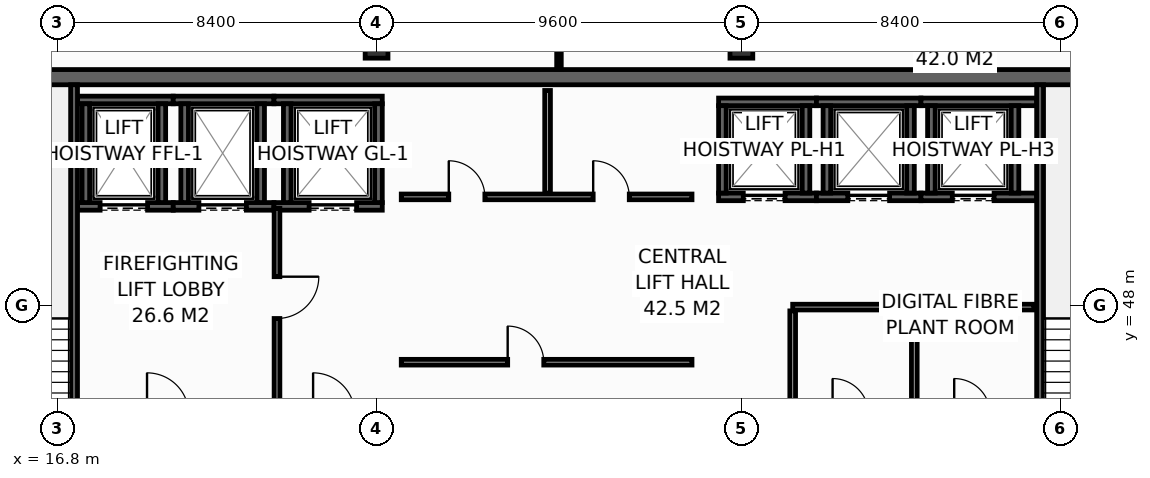
"""IFC4 building model, lengths in metres.
Left out: names, types, materials, properties, quantities, classifications, styles, units other than length and angle.
Written with IfcOpenShell. Run it as: python <this file> out.ifc"""

import sys

from ifc_helpers import new_model, si_unit, direction, frame, frame_2d, origin, origin_2d, place, context, subcontext, project, spatial, rectangle, hollow_rectangle, extrude, element, fill, save


model = new_model("IFC4")
c1 = context("Model", 3, precision=1e-05, world=origin(), true_north=direction((0.0, 1.0)))
c2 = subcontext(c1, "Body", "Model", "MODEL_VIEW")
j1 = project(units=[si_unit("LENGTHUNIT", "METRE"), si_unit("PLANEANGLEUNIT", "RADIAN")], contexts=[c1])
p1 = place(None, origin())
s1 = spatial("IfcSite", under=j1, at=p1, CompositionType="ELEMENT")
p2 = place(p1, origin())
s2 = spatial("IfcBuilding", under=s1, at=p2, CompositionType="ELEMENT")
p3 = place(p2, frame((0.0, 0.0, 291.4)))
s3 = spatial("IfcBuildingStorey", under=s2, at=p3, CompositionType="ELEMENT", Elevation=291.4)
p4 = place(p3, frame((13.7, 54.0, 0.0), z_axis=(0.0, 0.0, 1.0), x_axis=(1.0, 0.0, 0.0)))
e1 = element("IfcWall", 1, at=p4, inside=s3, PredefinedType="SHEAR", context=c2, shape_type="SweptSolid", body=[
    extrude(rectangle(XDim=32.5, YDim=0.4, at=frame_2d((16.25, 0.0))), origin(), (0.0, 0.0, 1.0), 3.55),
])
for number, where, z_axis, x_axis in (
    (2, (25.2, 54.8, 0.0), (0.0, 0.0, 1.0), (1.0, 0.0, 0.0)),
    (3, (34.8, 54.8, 0.0), (0.0, 0.0, 1.0), (1.0, 0.0, 0.0)),
):
    element("IfcColumn", number, at=place(p3, frame(where, z_axis=z_axis, x_axis=x_axis)), inside=s3, PredefinedType="COLUMN", context=c2, shape_type="SweptSolid", body=[
        extrude(hollow_rectangle(XDim=0.6, YDim=0.6, WallThickness=0.028, at=origin_2d()), origin(), (0.0, 0.0, 1.0), 3.8),
    ])
p5 = place(p3, frame((17.33, 50.6, 0.0), z_axis=(0.0, 0.0, 1.0), x_axis=(1.0, 0.0, 0.0)))
e4 = element("IfcWall", 4, at=p5, inside=s3, PredefinedType="SHEAR", context=c2, shape_type="SweptSolid", body=[
    extrude(rectangle(XDim=2.52, YDim=0.2, at=frame_2d((1.26, 0.0))), origin(), (0.0, 0.0, 1.0), 3.55),
])
p6 = place(p5, frame((0.595, 0.0, 0.0)))
e5 = element("IfcOpeningElement", 5, at=p6, cuts=e4, PredefinedType="OPENING", context=c2, shape_type="SweptSolid", body=[
    extrude(rectangle(XDim=1.25, YDim=2.3, at=frame_2d((0.625, 1.15))), frame((0.0, 0.11, 0.0), z_axis=(0.0, -1.0, 0.0), x_axis=(1.0, 0.0, 0.0)), (0.0, 0.0, 1.0), 0.22),
])
p7 = place(p3, frame((17.33, 53.4, 0.0), z_axis=(0.0, 0.0, 1.0), x_axis=(1.0, 0.0, 0.0)))
e6 = element("IfcWall", 6, at=p7, inside=s3, PredefinedType="SHEAR", context=c2, shape_type="SweptSolid", body=[
    extrude(rectangle(XDim=2.52, YDim=0.2, at=frame_2d((1.26, 0.0))), origin(), (0.0, 0.0, 1.0), 3.55),
])
for number, where, z_axis, x_axis in (
    (7, (17.55, 50.7, 0.0), (0.0, 0.0, 1.0), (0.0, 1.0, 0.0)),
    (8, (19.55, 50.7, 0.0), (0.0, 0.0, 1.0), (0.0, 1.0, 0.0)),
):
    element("IfcWall", number, at=place(p3, frame(where, z_axis=z_axis, x_axis=x_axis)), inside=s3, PredefinedType="SHEAR", context=c2, shape_type="SweptSolid", body=[
        extrude(rectangle(XDim=2.6, YDim=0.2, at=frame_2d((1.3, 0.0))), origin(), (0.0, 0.0, 1.0), 3.55),
    ])
p8 = place(p3, frame((19.85, 50.6, 0.0), z_axis=(0.0, 0.0, 1.0), x_axis=(1.0, 0.0, 0.0)))
e9 = element("IfcWall", 9, at=p8, inside=s3, PredefinedType="SHEAR", context=c2, shape_type="SweptSolid", body=[
    extrude(rectangle(XDim=2.65, YDim=0.2, at=frame_2d((1.325, 0.0))), origin(), (0.0, 0.0, 1.0), 3.55),
])
p9 = place(p8, frame((0.675, 0.0, 0.0)))
e10 = element("IfcOpeningElement", 10, at=p9, cuts=e9, PredefinedType="OPENING", context=c2, shape_type="SweptSolid", body=[
    extrude(rectangle(XDim=1.25, YDim=2.3, at=frame_2d((0.625, 1.15))), frame((0.0, 0.11, 0.0), z_axis=(0.0, -1.0, 0.0), x_axis=(1.0, 0.0, 0.0)), (0.0, 0.0, 1.0), 0.22),
])
p10 = place(p3, frame((19.85, 53.4, 0.0), z_axis=(0.0, 0.0, 1.0), x_axis=(1.0, 0.0, 0.0)))
e11 = element("IfcWall", 11, at=p10, inside=s3, PredefinedType="SHEAR", context=c2, shape_type="SweptSolid", body=[
    extrude(rectangle(XDim=2.65, YDim=0.2, at=frame_2d((1.325, 0.0))), origin(), (0.0, 0.0, 1.0), 3.55),
])
for number, where, z_axis, x_axis in (
    (12, (20.15, 50.7, 0.0), (0.0, 0.0, 1.0), (0.0, 1.0, 0.0)),
    (13, (22.15, 50.7, 0.0), (0.0, 0.0, 1.0), (0.0, 1.0, 0.0)),
):
    element("IfcWall", number, at=place(p3, frame(where, z_axis=z_axis, x_axis=x_axis)), inside=s3, PredefinedType="SHEAR", context=c2, shape_type="SweptSolid", body=[
        extrude(rectangle(XDim=2.6, YDim=0.2, at=frame_2d((1.3, 0.0))), origin(), (0.0, 0.0, 1.0), 3.55),
    ])
p11 = place(p3, frame((22.5, 50.6, 0.0), z_axis=(0.0, 0.0, 1.0), x_axis=(1.0, 0.0, 0.0)))
e14 = element("IfcWall", 14, at=p11, inside=s3, PredefinedType="SHEAR", context=c2, shape_type="SweptSolid", body=[
    extrude(rectangle(XDim=2.85, YDim=0.2, at=frame_2d((1.425, 0.0))), origin(), (0.0, 0.0, 1.0), 3.55),
])
p12 = place(p11, frame((0.925, 0.0, 0.0)))
e15 = element("IfcOpeningElement", 15, at=p12, cuts=e14, PredefinedType="OPENING", context=c2, shape_type="SweptSolid", body=[
    extrude(rectangle(XDim=1.25, YDim=2.3, at=frame_2d((0.625, 1.15))), frame((0.0, 0.11, 0.0), z_axis=(0.0, -1.0, 0.0), x_axis=(1.0, 0.0, 0.0)), (0.0, 0.0, 1.0), 0.22),
])
p13 = place(p3, frame((22.5, 53.4, 0.0), z_axis=(0.0, 0.0, 1.0), x_axis=(1.0, 0.0, 0.0)))
e16 = element("IfcWall", 16, at=p13, inside=s3, PredefinedType="SHEAR", context=c2, shape_type="SweptSolid", body=[
    extrude(rectangle(XDim=2.85, YDim=0.2, at=frame_2d((1.425, 0.0))), origin(), (0.0, 0.0, 1.0), 3.55),
])
for number, where, z_axis, x_axis in (
    (17, (22.85, 50.7, 0.0), (0.0, 0.0, 1.0), (0.0, 1.0, 0.0)),
    (18, (25.25, 50.7, 0.0), (0.0, 0.0, 1.0), (0.0, 1.0, 0.0)),
):
    element("IfcWall", number, at=place(p3, frame(where, z_axis=z_axis, x_axis=x_axis)), inside=s3, PredefinedType="SHEAR", context=c2, shape_type="SweptSolid", body=[
        extrude(rectangle(XDim=2.6, YDim=0.2, at=frame_2d((1.3, 0.0))), origin(), (0.0, 0.0, 1.0), 3.55),
    ])
p14 = place(p3, frame((34.2, 50.85, 0.0), z_axis=(0.0, 0.0, 1.0), x_axis=(1.0, 0.0, 0.0)))
e19 = element("IfcWall", 19, at=p14, inside=s3, PredefinedType="SHEAR", context=c2, shape_type="SweptSolid", body=[
    extrude(rectangle(XDim=2.575, YDim=0.2, at=frame_2d((1.288, 0.0))), origin(), (0.0, 0.0, 1.0), 3.55),
])
p15 = place(p14, frame((0.65, 0.0, 0.0)))
e20 = element("IfcOpeningElement", 20, at=p15, cuts=e19, PredefinedType="OPENING", context=c2, shape_type="SweptSolid", body=[
    extrude(rectangle(XDim=1.1, YDim=2.2, at=frame_2d((0.55, 1.1))), frame((0.0, 0.11, 0.0), z_axis=(0.0, -1.0, 0.0), x_axis=(1.0, 0.0, 0.0)), (0.0, 0.0, 1.0), 0.22),
])
p16 = place(p3, frame((34.2, 53.35, 0.0), z_axis=(0.0, 0.0, 1.0), x_axis=(1.0, 0.0, 0.0)))
e21 = element("IfcWall", 21, at=p16, inside=s3, PredefinedType="SHEAR", context=c2, shape_type="SweptSolid", body=[
    extrude(rectangle(XDim=2.575, YDim=0.2, at=frame_2d((1.288, 0.0))), origin(), (0.0, 0.0, 1.0), 3.55),
])
for number, where, z_axis, x_axis in (
    (22, (34.3, 50.95, 0.0), (0.0, 0.0, 1.0), (0.0, 1.0, 0.0)),
    (23, (36.5, 50.95, 0.0), (0.0, 0.0, 1.0), (0.0, 1.0, 0.0)),
):
    element("IfcWall", number, at=place(p3, frame(where, z_axis=z_axis, x_axis=x_axis)), inside=s3, PredefinedType="SHEAR", context=c2, shape_type="SweptSolid", body=[
        extrude(rectangle(XDim=2.3, YDim=0.2, at=frame_2d((1.15, 0.0))), origin(), (0.0, 0.0, 1.0), 3.55),
    ])
p17 = place(p3, frame((36.775, 50.85, 0.0), z_axis=(0.0, 0.0, 1.0), x_axis=(1.0, 0.0, 0.0)))
e24 = element("IfcWall", 24, at=p17, inside=s3, PredefinedType="SHEAR", context=c2, shape_type="SweptSolid", body=[
    extrude(rectangle(XDim=2.75, YDim=0.2, at=frame_2d((1.375, 0.0))), origin(), (0.0, 0.0, 1.0), 3.55),
])
p18 = place(p17, frame((0.825, 0.0, 0.0)))
e25 = element("IfcOpeningElement", 25, at=p18, cuts=e24, PredefinedType="OPENING", context=c2, shape_type="SweptSolid", body=[
    extrude(rectangle(XDim=1.1, YDim=2.2, at=frame_2d((0.55, 1.1))), frame((0.0, 0.11, 0.0), z_axis=(0.0, -1.0, 0.0), x_axis=(1.0, 0.0, 0.0)), (0.0, 0.0, 1.0), 0.22),
])
p19 = place(p3, frame((36.775, 53.35, 0.0), z_axis=(0.0, 0.0, 1.0), x_axis=(1.0, 0.0, 0.0)))
e26 = element("IfcWall", 26, at=p19, inside=s3, PredefinedType="SHEAR", context=c2, shape_type="SweptSolid", body=[
    extrude(rectangle(XDim=2.75, YDim=0.2, at=frame_2d((1.375, 0.0))), origin(), (0.0, 0.0, 1.0), 3.55),
])
for number, where, z_axis, x_axis in (
    (27, (37.05, 50.95, 0.0), (0.0, 0.0, 1.0), (0.0, 1.0, 0.0)),
    (28, (39.25, 50.95, 0.0), (0.0, 0.0, 1.0), (0.0, 1.0, 0.0)),
):
    element("IfcWall", number, at=place(p3, frame(where, z_axis=z_axis, x_axis=x_axis)), inside=s3, PredefinedType="SHEAR", context=c2, shape_type="SweptSolid", body=[
        extrude(rectangle(XDim=2.3, YDim=0.2, at=frame_2d((1.15, 0.0))), origin(), (0.0, 0.0, 1.0), 3.55),
    ])
p20 = place(p3, frame((39.525, 50.85, 0.0), z_axis=(0.0, 0.0, 1.0), x_axis=(1.0, 0.0, 0.0)))
e29 = element("IfcWall", 29, at=p20, inside=s3, PredefinedType="SHEAR", context=c2, shape_type="SweptSolid", body=[
    extrude(rectangle(XDim=3.045, YDim=0.2, at=frame_2d((1.522, 0.0))), origin(), (0.0, 0.0, 1.0), 3.55),
])
p21 = place(p20, frame((0.825, 0.0, 0.0)))
e30 = element("IfcOpeningElement", 30, at=p21, cuts=e29, PredefinedType="OPENING", context=c2, shape_type="SweptSolid", body=[
    extrude(rectangle(XDim=1.1, YDim=2.2, at=frame_2d((0.55, 1.1))), frame((0.0, 0.11, 0.0), z_axis=(0.0, -1.0, 0.0), x_axis=(1.0, 0.0, 0.0)), (0.0, 0.0, 1.0), 0.22),
])
p22 = place(p3, frame((39.525, 53.35, 0.0), z_axis=(0.0, 0.0, 1.0), x_axis=(1.0, 0.0, 0.0)))
e31 = element("IfcWall", 31, at=p22, inside=s3, PredefinedType="SHEAR", context=c2, shape_type="SweptSolid", body=[
    extrude(rectangle(XDim=3.045, YDim=0.2, at=frame_2d((1.522, 0.0))), origin(), (0.0, 0.0, 1.0), 3.55),
])
for number, where, z_axis, x_axis in (
    (32, (39.8, 50.95, 0.0), (0.0, 0.0, 1.0), (0.0, 1.0, 0.0)),
    (33, (42.0, 50.95, 0.0), (0.0, 0.0, 1.0), (0.0, 1.0, 0.0)),
):
    element("IfcWall", number, at=place(p3, frame(where, z_axis=z_axis, x_axis=x_axis)), inside=s3, PredefinedType="SHEAR", context=c2, shape_type="SweptSolid", body=[
        extrude(rectangle(XDim=2.3, YDim=0.2, at=frame_2d((1.15, 0.0))), origin(), (0.0, 0.0, 1.0), 3.55),
    ])
p23 = place(p3, frame((17.24, 43.4, 0.0), z_axis=(0.0, 0.0, 1.0), x_axis=(0.0, 1.0, 0.0)))
e34 = element("IfcWall", 34, at=p23, inside=s3, PredefinedType="SHEAR", context=c2, shape_type="SweptSolid", body=[
    extrude(rectangle(XDim=10.4, YDim=0.18, at=frame_2d((5.2, 0.0))), origin(), (0.0, 0.0, 1.0), 3.55),
])
p24 = place(p23, frame((0.16, 0.0, 0.0)))
e35 = element("IfcOpeningElement", 35, at=p24, cuts=e34, PredefinedType="OPENING", context=c2, shape_type="SweptSolid", body=[
    extrude(rectangle(XDim=1.0, YDim=2.15, at=frame_2d((0.5, 1.075))), frame((0.0, 0.1, 0.0), z_axis=(0.0, -1.0, 0.0), x_axis=(1.0, 0.0, 0.0)), (0.0, 0.0, 1.0), 0.2),
])
p25 = place(p3, frame((42.66, 53.8, 0.0), z_axis=(0.0, 0.0, 1.0), x_axis=(0.0, -1.0, 0.0)))
e36 = element("IfcWall", 36, at=p25, inside=s3, PredefinedType="SHEAR", context=c2, shape_type="SweptSolid", body=[
    extrude(rectangle(XDim=10.4, YDim=0.18, at=frame_2d((5.2, 0.0))), origin(), (0.0, 0.0, 1.0), 3.55),
])
p26 = place(p25, frame((8.99, 0.0, 0.0)))
e37 = element("IfcOpeningElement", 37, at=p26, cuts=e36, PredefinedType="OPENING", context=c2, shape_type="SweptSolid", body=[
    extrude(rectangle(XDim=1.1, YDim=2.15, at=frame_2d((0.55, 1.075))), frame((0.0, 0.1, 0.0), z_axis=(0.0, -1.0, 0.0), x_axis=(1.0, 0.0, 0.0)), (0.0, 0.0, 1.0), 0.2),
])
p27 = place(p3, frame((22.58, 50.55, 0.0), z_axis=(0.0, 0.0, 1.0), x_axis=(0.0, -1.0, 0.0)))
e38 = element("IfcWall", 38, at=p27, inside=s3, PredefinedType="PARTITIONING", context=c2, shape_type="SweptSolid", body=[
    extrude(rectangle(XDim=5.33, YDim=0.15, at=frame_2d((2.665, 0.0))), origin(), (0.0, 0.0, 1.0), 3.55),
])
p28 = place(p27, frame((1.8, 0.0, 0.0)))
e39 = element("IfcOpeningElement", 39, at=p28, cuts=e38, PredefinedType="OPENING", context=c2, shape_type="SweptSolid", body=[
    extrude(rectangle(XDim=1.1, YDim=2.15, at=frame_2d((0.55, 1.075))), frame((0.0, 0.085, 0.0), z_axis=(0.0, -1.0, 0.0), x_axis=(1.0, 0.0, 0.0)), (0.0, 0.0, 1.0), 0.17),
])
p29 = place(p3, frame((36.15, 47.95, 0.0), z_axis=(0.0, 0.0, 1.0), x_axis=(1.0, 0.0, 0.0)))
e40 = element("IfcWall", 40, at=p29, inside=s3, PredefinedType="PARTITIONING", context=c2, shape_type="SweptSolid", body=[
    extrude(rectangle(XDim=6.35, YDim=0.15, at=frame_2d((3.175, 0.0))), origin(), (0.0, 0.0, 1.0), 3.55),
])
for number, where, z_axis, x_axis in (
    (41, (36.15, 45.22, 0.0), (0.0, 0.0, 1.0), (0.0, 1.0, 0.0)),
    (42, (39.35, 45.22, 0.0), (0.0, 0.0, 1.0), (0.0, 1.0, 0.0)),
):
    element("IfcWall", number, at=place(p3, frame(where, z_axis=z_axis, x_axis=x_axis)), inside=s3, PredefinedType="PARTITIONING", context=c2, shape_type="SweptSolid", body=[
        extrude(rectangle(XDim=2.63, YDim=0.15, at=frame_2d((1.315, 0.0))), origin(), (0.0, 0.0, 1.0), 3.55),
    ])
p30 = place(p3, frame((25.85, 50.85, 0.0), z_axis=(0.0, 0.0, 1.0), x_axis=(1.0, 0.0, 0.0)))
e43 = element("IfcWall", 43, at=p30, inside=s3, PredefinedType="PARTITIONING", context=c2, shape_type="SweptSolid", body=[
    extrude(rectangle(XDim=7.65, YDim=0.15, at=frame_2d((3.825, 0.0))), origin(), (0.0, 0.0, 1.0), 3.55),
])
p31 = place(p30, frame((1.25, 0.0, 0.0)))
e44 = element("IfcOpeningElement", 44, at=p31, cuts=e43, PredefinedType="OPENING", context=c2, shape_type="SweptSolid", body=[
    extrude(rectangle(XDim=0.95, YDim=2.15, at=frame_2d((0.475, 1.075))), frame((0.0, 0.085, 0.0), z_axis=(0.0, -1.0, 0.0), x_axis=(1.0, 0.0, 0.0)), (0.0, 0.0, 1.0), 0.17),
])
p32 = place(p30, frame((5.05, 0.0, 0.0)))
e45 = element("IfcOpeningElement", 45, at=p32, cuts=e43, PredefinedType="OPENING", context=c2, shape_type="SweptSolid", body=[
    extrude(rectangle(XDim=0.95, YDim=2.15, at=frame_2d((0.475, 1.075))), frame((0.0, 0.085, 0.0), z_axis=(0.0, -1.0, 0.0), x_axis=(1.0, 0.0, 0.0)), (0.0, 0.0, 1.0), 0.17),
])
p33 = place(p3, frame((29.7, 50.95, 0.0), z_axis=(0.0, 0.0, 1.0), x_axis=(0.0, 1.0, 0.0)))
e46 = element("IfcWall", 46, at=p33, inside=s3, PredefinedType="PARTITIONING", context=c2, shape_type="SweptSolid", body=[
    extrude(rectangle(XDim=2.7, YDim=0.15, at=frame_2d((1.35, 0.0))), origin(), (0.0, 0.0, 1.0), 3.55),
])
p34 = place(p3, frame((25.85, 46.5, 0.0), z_axis=(0.0, 0.0, 1.0), x_axis=(1.0, 0.0, 0.0)))
e47 = element("IfcWall", 47, at=p34, inside=s3, PredefinedType="PARTITIONING", context=c2, shape_type="SweptSolid", body=[
    extrude(rectangle(XDim=7.65, YDim=0.15, at=frame_2d((3.825, 0.0))), origin(), (0.0, 0.0, 1.0), 3.55),
])
p35 = place(p34, frame((2.8, 0.0, 0.0)))
e48 = element("IfcOpeningElement", 48, at=p35, cuts=e47, PredefinedType="OPENING", context=c2, shape_type="SweptSolid", body=[
    extrude(rectangle(XDim=0.95, YDim=2.15, at=frame_2d((0.475, 1.075))), frame((0.0, 0.085, 0.0), z_axis=(0.0, -1.0, 0.0), x_axis=(1.0, 0.0, 0.0)), (0.0, 0.0, 1.0), 0.17),
])
p36 = place(p3, frame((30.0, 54.22, 0.0), z_axis=(0.0, 0.0, 1.0), x_axis=(0.0, 1.0, 0.0)))
e49 = element("IfcWall", 49, at=p36, inside=s3, PredefinedType="PARTITIONING", context=c2, shape_type="SweptSolid", body=[
    extrude(rectangle(XDim=1.775, YDim=0.12, at=frame_2d((0.888, 0.0))), origin(), (0.0, 0.0, 1.0), 2.935),
])
p37 = place(p6, origin())
e50 = element("IfcDoor", 50, at=p37, inside=s3, OperationType="SLIDING_TO_LEFT", PredefinedType="DOOR", context=c2, shape_type="SweptSolid", body=[
    extrude(rectangle(XDim=1.25, YDim=2.3, at=frame_2d((0.625, 1.15))), frame((0.0, 0.025, 0.0), z_axis=(0.0, -1.0, 0.0), x_axis=(1.0, 0.0, 0.0)), (0.0, 0.0, 1.0), 0.05),
])
fill(e5, e50)
p38 = place(p9, origin())
e51 = element("IfcDoor", 51, at=p38, inside=s3, OperationType="SLIDING_TO_LEFT", PredefinedType="DOOR", context=c2, shape_type="SweptSolid", body=[
    extrude(rectangle(XDim=1.25, YDim=2.3, at=frame_2d((0.625, 1.15))), frame((0.0, 0.025, 0.0), z_axis=(0.0, -1.0, 0.0), x_axis=(1.0, 0.0, 0.0)), (0.0, 0.0, 1.0), 0.05),
])
fill(e10, e51)
p39 = place(p12, origin())
e52 = element("IfcDoor", 52, at=p39, inside=s3, OperationType="SLIDING_TO_LEFT", PredefinedType="DOOR", context=c2, shape_type="SweptSolid", body=[
    extrude(rectangle(XDim=1.25, YDim=2.3, at=frame_2d((0.625, 1.15))), frame((0.0, 0.025, 0.0), z_axis=(0.0, -1.0, 0.0), x_axis=(1.0, 0.0, 0.0)), (0.0, 0.0, 1.0), 0.05),
])
fill(e15, e52)
p40 = place(p15, origin())
e53 = element("IfcDoor", 53, at=p40, inside=s3, OperationType="SLIDING_TO_LEFT", PredefinedType="DOOR", context=c2, shape_type="SweptSolid", body=[
    extrude(rectangle(XDim=1.1, YDim=2.2, at=frame_2d((0.55, 1.1))), frame((0.0, 0.025, 0.0), z_axis=(0.0, -1.0, 0.0), x_axis=(1.0, 0.0, 0.0)), (0.0, 0.0, 1.0), 0.05),
])
fill(e20, e53)
p41 = place(p18, origin())
e54 = element("IfcDoor", 54, at=p41, inside=s3, OperationType="SLIDING_TO_LEFT", PredefinedType="DOOR", context=c2, shape_type="SweptSolid", body=[
    extrude(rectangle(XDim=1.1, YDim=2.2, at=frame_2d((0.55, 1.1))), frame((0.0, 0.025, 0.0), z_axis=(0.0, -1.0, 0.0), x_axis=(1.0, 0.0, 0.0)), (0.0, 0.0, 1.0), 0.05),
])
fill(e25, e54)
p42 = place(p21, origin())
e55 = element("IfcDoor", 55, at=p42, inside=s3, OperationType="SLIDING_TO_LEFT", PredefinedType="DOOR", context=c2, shape_type="SweptSolid", body=[
    extrude(rectangle(XDim=1.1, YDim=2.2, at=frame_2d((0.55, 1.1))), frame((0.0, 0.025, 0.0), z_axis=(0.0, -1.0, 0.0), x_axis=(1.0, 0.0, 0.0)), (0.0, 0.0, 1.0), 0.05),
])
fill(e30, e55)
p43 = place(p28, origin())
e56 = element("IfcDoor", 56, at=p43, inside=s3, OperationType="SINGLE_SWING_LEFT", PredefinedType="DOOR", context=c2, shape_type="SweptSolid", body=[
    extrude(rectangle(XDim=1.1, YDim=2.15, at=frame_2d((0.55, 1.075))), frame((0.0, 0.025, 0.0), z_axis=(0.0, -1.0, 0.0), x_axis=(1.0, 0.0, 0.0)), (0.0, 0.0, 1.0), 0.05),
])
fill(e39, e56)
p44 = place(p31, origin())
e57 = element("IfcDoor", 57, at=p44, inside=s3, OperationType="SINGLE_SWING_LEFT", PredefinedType="DOOR", context=c2, shape_type="SweptSolid", body=[
    extrude(rectangle(XDim=0.95, YDim=2.15, at=frame_2d((0.475, 1.075))), frame((0.0, 0.025, 0.0), z_axis=(0.0, -1.0, 0.0), x_axis=(1.0, 0.0, 0.0)), (0.0, 0.0, 1.0), 0.05),
])
fill(e44, e57)
p45 = place(p32, origin())
e58 = element("IfcDoor", 58, at=p45, inside=s3, OperationType="SINGLE_SWING_LEFT", PredefinedType="DOOR", context=c2, shape_type="SweptSolid", body=[
    extrude(rectangle(XDim=0.95, YDim=2.15, at=frame_2d((0.475, 1.075))), frame((0.0, 0.025, 0.0), z_axis=(0.0, -1.0, 0.0), x_axis=(1.0, 0.0, 0.0)), (0.0, 0.0, 1.0), 0.05),
])
fill(e45, e58)
p46 = place(p35, origin())
e59 = element("IfcDoor", 59, at=p46, inside=s3, OperationType="SINGLE_SWING_LEFT", PredefinedType="DOOR", context=c2, shape_type="SweptSolid", body=[
    extrude(rectangle(XDim=0.95, YDim=2.15, at=frame_2d((0.475, 1.075))), frame((0.0, 0.025, 0.0), z_axis=(0.0, -1.0, 0.0), x_axis=(1.0, 0.0, 0.0)), (0.0, 0.0, 1.0), 0.05),
])
fill(e48, e59)
save(model, sys.argv[1])
